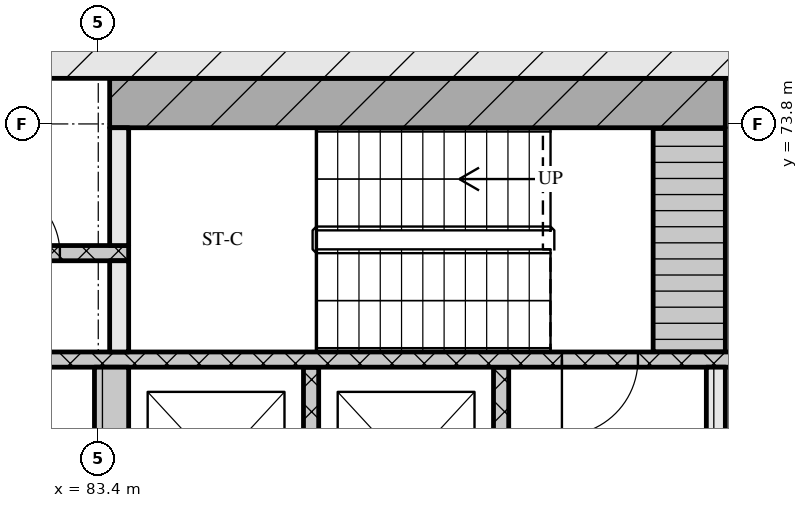
"""IFC4 building model, lengths in metres.
Left out: names, types, materials, properties, quantities, classifications, styles, units other than length and angle.
Written with IfcOpenShell. Run it as: python <this file> out.ifc"""

import sys

from ifc_helpers import new_model, si_unit, direction, frame, frame_2d, origin, place, context, subcontext, project, spatial, rectangle, extrude, element, fill, save


model = new_model("IFC4")
c1 = context("Model", 3, precision=1e-05, world=origin(), true_north=direction((0.0, 1.0)))
c2 = subcontext(c1, "Body", "Model", "MODEL_VIEW")
j1 = project(units=[si_unit("LENGTHUNIT", "METRE"), si_unit("PLANEANGLEUNIT", "RADIAN")], contexts=[c1])
p1 = place(None, origin())
s1 = spatial("IfcSite", under=j1, at=p1, CompositionType="ELEMENT")
p2 = place(p1, origin())
s2 = spatial("IfcBuilding", under=s1, at=p2, CompositionType="ELEMENT")
p3 = place(p2, frame((0.0, 0.0, 28.2)))
s3 = spatial("IfcBuildingStorey", under=s2, at=p3, CompositionType="ELEMENT", Elevation=28.2)
p4 = place(p3, frame((66.6, 75.0, 0.0), z_axis=(0.0, 0.0, 1.0), x_axis=(1.0, 0.0, 0.0)))
e1 = element("IfcWall", 1, at=p4, inside=s3, PredefinedType="SOLIDWALL", context=c2, shape_type="SweptSolid", body=[
    extrude(rectangle(XDim=42.0, YDim=1.2, at=frame_2d((21.0, 0.0))), origin(), (0.0, 0.0, 1.0), 4.2),
])
p5 = place(p3, frame((83.575, 68.0, 0.0), z_axis=(0.0, 0.0, 1.0), x_axis=(0.0, 1.0, 0.0)))
e2 = element("IfcWall", 2, at=p5, inside=s3, PredefinedType="SOLIDWALL", context=c2, shape_type="SweptSolid", body=[
    extrude(rectangle(XDim=2.6, YDim=0.45, at=frame_2d((1.3, 0.0))), origin(), (0.0, 0.0, 1.0), 4.2),
])
for number, where, z_axis, x_axis in (
    (3, (86.2, 68.0, 0.0), (0.0, 0.0, 1.0), (0.0, 1.0, 0.0)),
    (4, (88.7, 68.0, 0.0), (0.0, 0.0, 1.0), (0.0, 1.0, 0.0)),
):
    element("IfcWall", number, at=place(p3, frame(where, z_axis=z_axis, x_axis=x_axis)), inside=s3, PredefinedType="SOLIDWALL", context=c2, shape_type="SweptSolid", body=[
        extrude(rectangle(XDim=2.6, YDim=0.2, at=frame_2d((1.3, 0.0))), origin(), (0.0, 0.0, 1.0), 4.2),
    ])
p6 = place(p3, frame((91.525, 68.0, 0.0), z_axis=(0.0, 0.0, 1.0), x_axis=(0.0, 1.0, 0.0)))
e5 = element("IfcWall", 5, at=p6, inside=s3, PredefinedType="SOLIDWALL", context=c2, shape_type="SweptSolid", body=[
    extrude(rectangle(XDim=2.6, YDim=0.25, at=frame_2d((1.3, 0.0))), origin(), (0.0, 0.0, 1.0), 4.2),
])
p7 = place(p3, frame((67.8, 70.7, 0.0), z_axis=(0.0, 0.0, 1.0), x_axis=(1.0, 0.0, 0.0)))
e6 = element("IfcWall", 6, at=p7, inside=s3, PredefinedType="SOLIDWALL", context=c2, shape_type="SweptSolid", body=[
    extrude(rectangle(XDim=39.6, YDim=0.2, at=frame_2d((19.8, 0.0))), origin(), (0.0, 0.0, 1.0), 4.2),
])
p8 = place(p7, frame((0.65, 0.0, 0.0)))
e7 = element("IfcOpeningElement", 7, at=p8, cuts=e6, PredefinedType="OPENING", context=c2, shape_type="SweptSolid", body=[
    extrude(rectangle(XDim=1.1, YDim=2.1, at=frame_2d((0.55, 1.05))), frame((0.0, 0.11, 0.0), z_axis=(0.0, -1.0, 0.0), x_axis=(1.0, 0.0, 0.0)), (0.0, 0.0, 1.0), 0.22),
])
p9 = place(p7, frame((3.25, 0.0, 0.0)))
e8 = element("IfcOpeningElement", 8, at=p9, cuts=e6, PredefinedType="OPENING", context=c2, shape_type="SweptSolid", body=[
    extrude(rectangle(XDim=1.1, YDim=2.1, at=frame_2d((0.55, 1.05))), frame((0.0, 0.11, 0.0), z_axis=(0.0, -1.0, 0.0), x_axis=(1.0, 0.0, 0.0)), (0.0, 0.0, 1.0), 0.22),
])
p10 = place(p7, frame((5.9, 0.0, 0.0)))
e9 = element("IfcOpeningElement", 9, at=p10, cuts=e6, PredefinedType="OPENING", context=c2, shape_type="SweptSolid", body=[
    extrude(rectangle(XDim=1.0, YDim=2.1, at=frame_2d((0.5, 1.05))), frame((0.0, 0.11, 0.0), z_axis=(0.0, -1.0, 0.0), x_axis=(1.0, 0.0, 0.0)), (0.0, 0.0, 1.0), 0.22),
])
p11 = place(p7, frame((21.7, 0.0, 0.0)))
e10 = element("IfcOpeningElement", 10, at=p11, cuts=e6, PredefinedType="OPENING", context=c2, shape_type="SweptSolid", body=[
    extrude(rectangle(XDim=1.0, YDim=2.1, at=frame_2d((0.5, 1.05))), frame((0.0, 0.11, 0.0), z_axis=(0.0, -1.0, 0.0), x_axis=(1.0, 0.0, 0.0)), (0.0, 0.0, 1.0), 0.22),
])
p12 = place(p7, frame((32.7, 0.0, 0.0)))
e11 = element("IfcOpeningElement", 11, at=p12, cuts=e6, PredefinedType="OPENING", context=c2, shape_type="SweptSolid", body=[
    extrude(rectangle(XDim=1.0, YDim=2.1, at=frame_2d((0.5, 1.05))), frame((0.0, 0.11, 0.0), z_axis=(0.0, -1.0, 0.0), x_axis=(1.0, 0.0, 0.0)), (0.0, 0.0, 1.0), 0.22),
])
p13 = place(p7, frame((35.25, 0.0, 0.0)))
e12 = element("IfcOpeningElement", 12, at=p13, cuts=e6, PredefinedType="OPENING", context=c2, shape_type="SweptSolid", body=[
    extrude(rectangle(XDim=1.1, YDim=2.1, at=frame_2d((0.55, 1.05))), frame((0.0, 0.11, 0.0), z_axis=(0.0, -1.0, 0.0), x_axis=(1.0, 0.0, 0.0)), (0.0, 0.0, 1.0), 0.22),
])
p14 = place(p7, frame((37.85, 0.0, 0.0)))
e13 = element("IfcOpeningElement", 13, at=p14, cuts=e6, PredefinedType="OPENING", context=c2, shape_type="SweptSolid", body=[
    extrude(rectangle(XDim=1.1, YDim=2.1, at=frame_2d((0.55, 1.05))), frame((0.0, 0.11, 0.0), z_axis=(0.0, -1.0, 0.0), x_axis=(1.0, 0.0, 0.0)), (0.0, 0.0, 1.0), 0.22),
])
p15 = place(p3, frame((83.675, 70.8, 0.0), z_axis=(0.0, 0.0, 1.0), x_axis=(0.0, 1.0, 0.0)))
e14 = element("IfcWall", 14, at=p15, inside=s3, PredefinedType="SOLIDWALL", context=c2, shape_type="SweptSolid", body=[
    extrude(rectangle(XDim=1.2, YDim=0.25, at=frame_2d((0.6, 0.0))), origin(), (0.0, 0.0, 1.0), 4.2),
])
p16 = place(p3, frame((91.175, 70.8, 0.0), z_axis=(0.0, 0.0, 1.0), x_axis=(0.0, 1.0, 0.0)))
e15 = element("IfcWall", 15, at=p16, inside=s3, PredefinedType="SOLIDWALL", context=c2, shape_type="SweptSolid", body=[
    extrude(rectangle(XDim=2.95, YDim=0.95, at=frame_2d((1.475, 0.0))), origin(), (0.0, 0.0, 1.0), 4.2),
])
p17 = place(p3, frame((72.8, 72.1, 0.0), z_axis=(0.0, 0.0, 1.0), x_axis=(1.0, 0.0, 0.0)))
e16 = element("IfcWall", 16, at=p17, inside=s3, PredefinedType="SOLIDWALL", context=c2, shape_type="SweptSolid", body=[
    extrude(rectangle(XDim=11.0, YDim=0.2, at=frame_2d((5.5, 0.0))), origin(), (0.0, 0.0, 1.0), 4.2),
])
p18 = place(p17, frame((1.25, 0.0, 0.0)))
e17 = element("IfcOpeningElement", 17, at=p18, cuts=e16, PredefinedType="OPENING", context=c2, shape_type="SweptSolid", body=[
    extrude(rectangle(XDim=0.9, YDim=2.1, at=frame_2d((0.45, 1.05))), frame((0.0, 0.11, 0.0), z_axis=(0.0, -1.0, 0.0), x_axis=(1.0, 0.0, 0.0)), (0.0, 0.0, 1.0), 0.22),
])
p19 = place(p17, frame((3.85, 0.0, 0.0)))
e18 = element("IfcOpeningElement", 18, at=p19, cuts=e16, PredefinedType="OPENING", context=c2, shape_type="SweptSolid", body=[
    extrude(rectangle(XDim=0.9, YDim=2.1, at=frame_2d((0.45, 1.05))), frame((0.0, 0.11, 0.0), z_axis=(0.0, -1.0, 0.0), x_axis=(1.0, 0.0, 0.0)), (0.0, 0.0, 1.0), 0.22),
])
p20 = place(p17, frame((6.42, 0.0, 0.0)))
e19 = element("IfcOpeningElement", 19, at=p20, cuts=e16, PredefinedType="OPENING", context=c2, shape_type="SweptSolid", body=[
    extrude(rectangle(XDim=0.9, YDim=2.1, at=frame_2d((0.45, 1.05))), frame((0.0, 0.11, 0.0), z_axis=(0.0, -1.0, 0.0), x_axis=(1.0, 0.0, 0.0)), (0.0, 0.0, 1.0), 0.22),
])
p21 = place(p17, frame((9.195, 0.0, 0.0)))
e20 = element("IfcOpeningElement", 20, at=p21, cuts=e16, PredefinedType="OPENING", context=c2, shape_type="SweptSolid", body=[
    extrude(rectangle(XDim=0.9, YDim=2.1, at=frame_2d((0.45, 1.05))), frame((0.0, 0.11, 0.0), z_axis=(0.0, -1.0, 0.0), x_axis=(1.0, 0.0, 0.0)), (0.0, 0.0, 1.0), 0.22),
])
p22 = place(p3, frame((83.675, 72.2, 0.0), z_axis=(0.0, 0.0, 1.0), x_axis=(0.0, 1.0, 0.0)))
e21 = element("IfcWall", 21, at=p22, inside=s3, PredefinedType="SOLIDWALL", context=c2, shape_type="SweptSolid", body=[
    extrude(rectangle(XDim=1.55, YDim=0.25, at=frame_2d((0.775, 0.0))), origin(), (0.0, 0.0, 1.0), 4.2),
])
p23 = place(p3, frame((83.55, 74.075, 0.0), z_axis=(0.0, 0.0, 1.0), x_axis=(1.0, 0.0, 0.0)))
e22 = element("IfcWall", 22, at=p23, inside=s3, PredefinedType="SOLIDWALL", context=c2, shape_type="SweptSolid", body=[
    extrude(rectangle(XDim=8.1, YDim=0.65, at=frame_2d((4.05, 0.0))), origin(), (0.0, 0.0, 1.0), 4.2),
])
p24 = place(p11, origin())
e23 = element("IfcDoor", 23, at=p24, inside=s3, OperationType="SINGLE_SWING_RIGHT", PredefinedType="DOOR", context=c2, shape_type="SweptSolid", body=[
    extrude(rectangle(XDim=1.0, YDim=2.1, at=frame_2d((0.5, 1.05))), frame((0.0, 0.025, 0.0), z_axis=(0.0, -1.0, 0.0), x_axis=(1.0, 0.0, 0.0)), (0.0, 0.0, 1.0), 0.05),
])
fill(e10, e23)
p25 = place(p21, origin())
e24 = element("IfcDoor", 24, at=p25, inside=s3, OperationType="SINGLE_SWING_LEFT", PredefinedType="DOOR", context=c2, shape_type="SweptSolid", body=[
    extrude(rectangle(XDim=0.9, YDim=2.1, at=frame_2d((0.45, 1.05))), frame((0.0, 0.025, 0.0), z_axis=(0.0, -1.0, 0.0), x_axis=(1.0, 0.0, 0.0)), (0.0, 0.0, 1.0), 0.05),
])
fill(e20, e24)
save(model, sys.argv[1])
